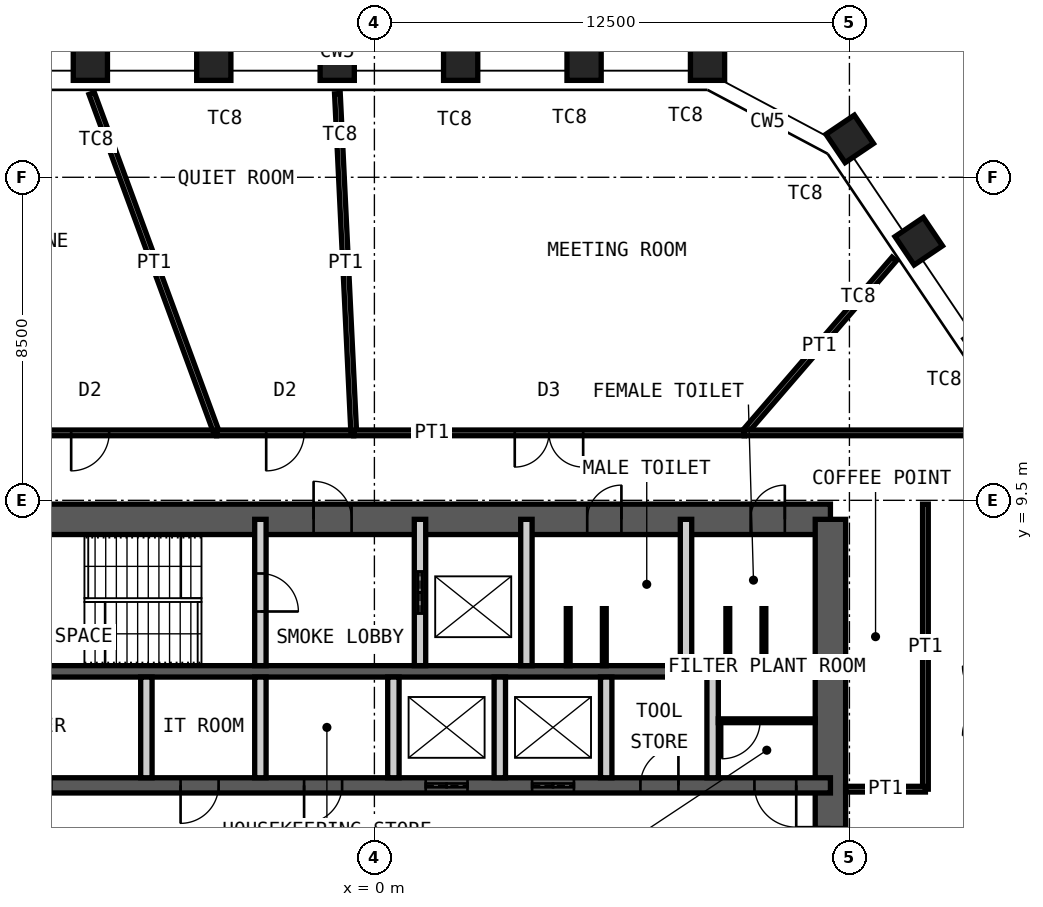
"""IFC4 building model, lengths in metres.
Left out: names, types, materials, properties, quantities, classifications, styles, units other than length and angle.
Written with IfcOpenShell. Run it as: python <this file> out.ifc"""

import sys

from ifc_helpers import new_model, si_unit, direction, frame, frame_2d, origin, origin_2d, place, context, subcontext, project, spatial, rectangle, hollow_rectangle, extrude, element, fill, save


model = new_model("IFC4")
c1 = context("Model", 3, precision=1e-05, world=origin(), true_north=direction((0.0, 1.0)))
c2 = subcontext(c1, "Body", "Model", "MODEL_VIEW")
j1 = project(units=[si_unit("LENGTHUNIT", "METRE"), si_unit("PLANEANGLEUNIT", "RADIAN")], contexts=[c1])
p1 = place(None, origin())
s1 = spatial("IfcSite", under=j1, at=p1, CompositionType="ELEMENT")
p2 = place(p1, origin())
s2 = spatial("IfcBuilding", under=s1, at=p2, CompositionType="ELEMENT")
p3 = place(p2, frame((0.0, 0.0, 308.2)))
s3 = spatial("IfcBuildingStorey", under=s2, at=p3, CompositionType="ELEMENT", Elevation=308.2)
for number, where, z_axis, x_axis in (
    (1, (-7.474, 21.0, 0.0), (0.0, 0.0, 1.0), (-1.0, 0.0, 0.0)),
    (2, (-4.226, 21.0, 0.0), (0.0, 0.0, 1.0), (-1.0, 0.0, 0.0)),
    (3, (-0.978, 21.0, 0.0), (0.0, 0.0, 1.0), (-1.0, 0.0, 0.0)),
    (4, (2.27, 21.0, 0.0), (0.0, 0.0, 1.0), (-1.0, 0.0, 0.0)),
    (5, (5.518, 21.0, 0.0), (0.0, 0.0, 1.0), (-1.0, 0.0, 0.0)),
    (6, (8.766, 21.0, 0.0), (0.0, 0.0, 1.0), (-1.0, 0.0, 0.0)),
    (7, (12.508, 19.01, 0.0), (0.0, 0.0, 1.0), (-0.559, 0.829, 0.0)),
    (8, (14.324, 16.318, 0.0), (0.0, 0.0, 1.0), (-0.559, 0.829, 0.0)),
):
    element("IfcColumn", number, at=place(p3, frame(where, z_axis=z_axis, x_axis=x_axis)), inside=s3, PredefinedType="COLUMN", context=c2, shape_type="SweptSolid", body=[
        extrude(hollow_rectangle(XDim=0.9, YDim=0.9, WallThickness=0.05, at=origin_2d()), origin(), (0.0, 0.0, 1.0), 4.2),
    ])
p4 = place(p3, frame((-12.0, 9.0, 0.0), z_axis=(0.0, 0.0, 1.0), x_axis=(1.0, 0.0, 0.0)))
e9 = element("IfcWall", 9, at=p4, inside=s3, PredefinedType="SHEAR", context=c2, shape_type="SweptSolid", body=[
    extrude(rectangle(XDim=24.0, YDim=0.8, at=frame_2d((12.0, 0.0))), origin(), (0.0, 0.0, 1.0), 4.2),
])
p5 = place(p4, frame((10.4, 0.0, 0.0)))
e10 = element("IfcOpeningElement", 10, at=p5, cuts=e9, PredefinedType="OPENING", context=c2, shape_type="SweptSolid", body=[
    extrude(rectangle(XDim=1.0, YDim=2.1, at=frame_2d((0.5, 1.05))), frame((0.0, 0.41, 0.0), z_axis=(0.0, -1.0, 0.0), x_axis=(1.0, 0.0, 0.0)), (0.0, 0.0, 1.0), 0.82),
])
p6 = place(p4, frame((17.6, 0.0, 0.0)))
e11 = element("IfcOpeningElement", 11, at=p6, cuts=e9, PredefinedType="OPENING", context=c2, shape_type="SweptSolid", body=[
    extrude(rectangle(XDim=0.9, YDim=2.1, at=frame_2d((0.45, 1.05))), frame((0.0, 0.41, 0.0), z_axis=(0.0, -1.0, 0.0), x_axis=(1.0, 0.0, 0.0)), (0.0, 0.0, 1.0), 0.82),
])
p7 = place(p4, frame((21.9, 0.0, 0.0)))
e12 = element("IfcOpeningElement", 12, at=p7, cuts=e9, PredefinedType="OPENING", context=c2, shape_type="SweptSolid", body=[
    extrude(rectangle(XDim=0.9, YDim=2.1, at=frame_2d((0.45, 1.05))), frame((0.0, 0.41, 0.0), z_axis=(0.0, -1.0, 0.0), x_axis=(1.0, 0.0, 0.0)), (0.0, 0.0, 1.0), 0.82),
])
p8 = place(p3, frame((12.0, -9.0, 0.0), z_axis=(0.0, 0.0, 1.0), x_axis=(0.0, 1.0, 0.0)))
e13 = element("IfcWall", 13, at=p8, inside=s3, PredefinedType="SHEAR", context=c2, shape_type="SweptSolid", body=[
    extrude(rectangle(XDim=18.0, YDim=0.8, at=frame_2d((9.0, 0.0))), origin(), (0.0, 0.0, 1.0), 4.2),
])
p9 = place(p8, frame((8.1, 0.0, 0.0)))
e14 = element("IfcOpeningElement", 14, at=p9, cuts=e13, PredefinedType="OPENING", context=c2, shape_type="SweptSolid", body=[
    extrude(rectangle(XDim=1.8, YDim=2.1, at=frame_2d((0.9, 1.05))), frame((0.0, 0.41, 0.0), z_axis=(0.0, -1.0, 0.0), x_axis=(1.0, 0.0, 0.0)), (0.0, 0.0, 1.0), 0.82),
])
p10 = place(p3, frame((-12.0, 5.0, 0.0), z_axis=(0.0, 0.0, 1.0), x_axis=(1.0, 0.0, 0.0)))
e15 = element("IfcWall", 15, at=p10, inside=s3, PredefinedType="SHEAR", context=c2, shape_type="SweptSolid", body=[
    extrude(rectangle(XDim=24.0, YDim=0.3, at=frame_2d((12.0, 0.0))), origin(), (0.0, 0.0, 1.0), 4.2),
])
p11 = place(p3, frame((-12.0, 2.0, 0.0), z_axis=(0.0, 0.0, 1.0), x_axis=(1.0, 0.0, 0.0)))
e16 = element("IfcWall", 16, at=p11, inside=s3, PredefinedType="SHEAR", context=c2, shape_type="SweptSolid", body=[
    extrude(rectangle(XDim=24.0, YDim=0.4, at=frame_2d((12.0, 0.0))), origin(), (0.0, 0.0, 1.0), 4.2),
])
p12 = place(p11, frame((2.4, 0.0, 0.0)))
e17 = element("IfcOpeningElement", 17, at=p12, cuts=e16, PredefinedType="OPENING", context=c2, shape_type="SweptSolid", body=[
    extrude(rectangle(XDim=1.1, YDim=2.1, at=frame_2d((0.55, 1.05))), frame((0.0, 0.21, 0.0), z_axis=(0.0, -1.0, 0.0), x_axis=(1.0, 0.0, 0.0)), (0.0, 0.0, 1.0), 0.42),
])
p13 = place(p11, frame((22.0, 0.0, 0.0)))
e18 = element("IfcOpeningElement", 18, at=p13, cuts=e16, PredefinedType="OPENING", context=c2, shape_type="SweptSolid", body=[
    extrude(rectangle(XDim=1.1, YDim=2.1, at=frame_2d((0.55, 1.05))), frame((0.0, 0.21, 0.0), z_axis=(0.0, -1.0, 0.0), x_axis=(1.0, 0.0, 0.0)), (0.0, 0.0, 1.0), 0.42),
])
p14 = place(p11, frame((10.15, 0.0, 0.0)))
e19 = element("IfcOpeningElement", 19, at=p14, cuts=e16, PredefinedType="OPENING", context=c2, shape_type="SweptSolid", body=[
    extrude(rectangle(XDim=1.0, YDim=2.1, at=frame_2d((0.5, 1.05))), frame((0.0, 0.21, 0.0), z_axis=(0.0, -1.0, 0.0), x_axis=(1.0, 0.0, 0.0)), (0.0, 0.0, 1.0), 0.42),
])
p15 = place(p11, frame((6.9, 0.0, 0.0)))
e20 = element("IfcOpeningElement", 20, at=p15, cuts=e16, PredefinedType="OPENING", context=c2, shape_type="SweptSolid", body=[
    extrude(rectangle(XDim=1.0, YDim=2.1, at=frame_2d((0.5, 1.05))), frame((0.0, 0.21, 0.0), z_axis=(0.0, -1.0, 0.0), x_axis=(1.0, 0.0, 0.0)), (0.0, 0.0, 1.0), 0.42),
])
p16 = place(p11, frame((13.35, 0.0, 0.0)))
e21 = element("IfcOpeningElement", 21, at=p16, cuts=e16, PredefinedType="OPENING", context=c2, shape_type="SweptSolid", body=[
    extrude(rectangle(XDim=1.1, YDim=2.4, at=frame_2d((0.55, 1.2))), frame((0.0, 0.21, 0.0), z_axis=(0.0, -1.0, 0.0), x_axis=(1.0, 0.0, 0.0)), (0.0, 0.0, 1.0), 0.42),
])
p17 = place(p11, frame((16.15, 0.0, 0.0)))
e22 = element("IfcOpeningElement", 22, at=p17, cuts=e16, PredefinedType="OPENING", context=c2, shape_type="SweptSolid", body=[
    extrude(rectangle(XDim=1.1, YDim=2.4, at=frame_2d((0.55, 1.2))), frame((0.0, 0.21, 0.0), z_axis=(0.0, -1.0, 0.0), x_axis=(1.0, 0.0, 0.0)), (0.0, 0.0, 1.0), 0.42),
])
p18 = place(p11, frame((19.0, 0.0, 0.0)))
e23 = element("IfcOpeningElement", 23, at=p18, cuts=e16, PredefinedType="OPENING", context=c2, shape_type="SweptSolid", body=[
    extrude(rectangle(XDim=1.0, YDim=2.1, at=frame_2d((0.5, 1.05))), frame((0.0, 0.21, 0.0), z_axis=(0.0, -1.0, 0.0), x_axis=(1.0, 0.0, 0.0)), (0.0, 0.0, 1.0), 0.42),
])
p19 = place(p3, frame((-3.0, 5.15, 0.0), z_axis=(0.0, 0.0, 1.0), x_axis=(0.0, 1.0, 0.0)))
e24 = element("IfcWall", 24, at=p19, inside=s3, PredefinedType="PARTITIONING", context=c2, shape_type="SweptSolid", body=[
    extrude(rectangle(XDim=3.85, YDim=0.3, at=frame_2d((1.925, 0.0))), origin(), (0.0, 0.0, 1.0), 3.98),
])
p20 = place(p19, frame((1.425, 0.0, 0.0)))
e25 = element("IfcOpeningElement", 25, at=p20, cuts=e24, PredefinedType="OPENING", context=c2, shape_type="SweptSolid", body=[
    extrude(rectangle(XDim=1.0, YDim=2.1, at=frame_2d((0.5, 1.05))), frame((0.0, 0.16, 0.0), z_axis=(0.0, -1.0, 0.0), x_axis=(1.0, 0.0, 0.0)), (0.0, 0.0, 1.0), 0.32),
])
p21 = place(p3, frame((1.2, 5.15, 0.0), z_axis=(0.0, 0.0, 1.0), x_axis=(0.0, 1.0, 0.0)))
e26 = element("IfcWall", 26, at=p21, inside=s3, PredefinedType="PARTITIONING", context=c2, shape_type="SweptSolid", body=[
    extrude(rectangle(XDim=3.85, YDim=0.3, at=frame_2d((1.925, 0.0))), origin(), (0.0, 0.0, 1.0), 3.98),
])
p22 = place(p21, frame((1.375, 0.0, 0.0)))
e27 = element("IfcOpeningElement", 27, at=p22, cuts=e26, PredefinedType="OPENING", context=c2, shape_type="SweptSolid", body=[
    extrude(rectangle(XDim=1.1, YDim=2.4, at=frame_2d((0.55, 1.2))), frame((0.0, 0.16, 0.0), z_axis=(0.0, -1.0, 0.0), x_axis=(1.0, 0.0, 0.0)), (0.0, 0.0, 1.0), 0.32),
])
for number, where, z_axis, x_axis in (
    (28, (4.0, 5.15, 0.0), (0.0, 0.0, 1.0), (0.0, 1.0, 0.0)),
    (29, (8.2, 5.15, 0.0), (0.0, 0.0, 1.0), (0.0, 1.0, 0.0)),
):
    element("IfcWall", number, at=place(p3, frame(where, z_axis=z_axis, x_axis=x_axis)), inside=s3, PredefinedType="PARTITIONING", context=c2, shape_type="SweptSolid", body=[
        extrude(rectangle(XDim=3.85, YDim=0.3, at=frame_2d((1.925, 0.0))), origin(), (0.0, 0.0, 1.0), 3.98),
    ])
for number, where, z_axis, x_axis in (
    (30, (-6.0, 2.2, 0.0), (0.0, 0.0, 1.0), (0.0, 1.0, 0.0)),
    (31, (-3.0, 2.2, 0.0), (0.0, 0.0, 1.0), (0.0, 1.0, 0.0)),
    (32, (0.5, 2.2, 0.0), (0.0, 0.0, 1.0), (0.0, 1.0, 0.0)),
    (33, (3.3, 2.2, 0.0), (0.0, 0.0, 1.0), (0.0, 1.0, 0.0)),
    (34, (6.1, 2.2, 0.0), (0.0, 0.0, 1.0), (0.0, 1.0, 0.0)),
    (35, (8.9, 2.2, 0.0), (0.0, 0.0, 1.0), (0.0, 1.0, 0.0)),
):
    element("IfcWall", number, at=place(p3, frame(where, z_axis=z_axis, x_axis=x_axis)), inside=s3, PredefinedType="PARTITIONING", context=c2, shape_type="SweptSolid", body=[
        extrude(rectangle(XDim=2.65, YDim=0.3, at=frame_2d((1.325, 0.0))), origin(), (0.0, 0.0, 1.0), 3.98),
    ])
p23 = place(p3, frame((9.05, 3.7, 0.0), z_axis=(0.0, 0.0, 1.0), x_axis=(1.0, 0.0, 0.0)))
e36 = element("IfcWall", 36, at=p23, inside=s3, PredefinedType="PARTITIONING", context=c2, shape_type="SweptSolid", body=[
    extrude(rectangle(XDim=2.55, YDim=0.1, at=frame_2d((1.275, 0.0))), origin(), (0.0, 0.0, 1.0), 3.98),
])
p24 = place(p23, frame((0.1, 0.0, 0.0)))
e37 = element("IfcOpeningElement", 37, at=p24, cuts=e36, PredefinedType="OPENING", context=c2, shape_type="SweptSolid", body=[
    extrude(rectangle(XDim=1.0, YDim=2.4, at=frame_2d((0.5, 1.2))), frame((0.0, 0.06, 0.0), z_axis=(0.0, -1.0, 0.0), x_axis=(1.0, 0.0, 0.0)), (0.0, 0.0, 1.0), 0.12),
])
for number, where, z_axis, x_axis in (
    (38, (5.1, 5.15, 0.0), (0.0, 0.0, 1.0), (0.0, 1.0, 0.0)),
    (39, (6.05, 5.15, 0.0), (0.0, 0.0, 1.0), (0.0, 1.0, 0.0)),
    (40, (9.3, 5.15, 0.0), (0.0, 0.0, 1.0), (0.0, 1.0, 0.0)),
    (41, (10.25, 5.15, 0.0), (0.0, 0.0, 1.0), (0.0, 1.0, 0.0)),
):
    element("IfcWall", number, at=place(p3, frame(where, z_axis=z_axis, x_axis=x_axis)), inside=s3, PredefinedType="PARTITIONING", context=c2, shape_type="SweptSolid", body=[
        extrude(rectangle(XDim=1.5, YDim=0.1, at=frame_2d((0.75, 0.0))), origin(), (0.0, 0.0, 1.0), 2.1),
    ])
p25 = place(p3, frame((13.678, 15.85, 0.0), z_axis=(0.0, 0.0, 1.0), x_axis=(-0.65333269737, -0.757070925704, 0.0)))
e42 = element("IfcWall", 42, at=p25, inside=s3, PredefinedType="PARTITIONING", context=c2, shape_type="SweptSolid", body=[
    extrude(rectangle(XDim=6.044, YDim=0.15, at=frame_2d((3.022, 0.0))), origin(), (0.0, 0.0, 1.0), 3.33),
])
p26 = place(p3, frame((9.73, 11.275, 0.0), z_axis=(0.0, 0.0, 1.0), x_axis=(1.0, 0.0, 0.0)))
e43 = element("IfcWall", 43, at=p26, inside=s3, PredefinedType="PARTITIONING", context=c2, shape_type="SweptSolid", body=[
    extrude(rectangle(XDim=6.645, YDim=0.15, at=frame_2d((3.323, 0.0))), origin(), (0.0, 0.0, 1.0), 4.03),
])
p27 = place(p3, frame((-10.807, 11.275, 0.0), z_axis=(0.0, 0.0, 1.0), x_axis=(1.0, 0.0, 0.0)))
e44 = element("IfcWall", 44, at=p27, inside=s3, PredefinedType="PARTITIONING", context=c2, shape_type="SweptSolid", body=[
    extrude(rectangle(XDim=6.656, YDim=0.15, at=frame_2d((3.328, 0.0))), origin(), (0.0, 0.0, 1.0), 4.03),
])
p28 = place(p27, frame((2.828, 0.0, 0.0)))
e45 = element("IfcOpeningElement", 45, at=p28, cuts=e44, PredefinedType="OPENING", context=c2, shape_type="SweptSolid", body=[
    extrude(rectangle(XDim=1.0, YDim=2.4, at=frame_2d((0.5, 1.2))), frame((0.0, 0.085, 0.0), z_axis=(0.0, -1.0, 0.0), x_axis=(1.0, 0.0, 0.0)), (0.0, 0.0, 1.0), 0.17),
])
p29 = place(p3, frame((-7.44, 20.206, 0.0), z_axis=(0.0, 0.0, 1.0), x_axis=(0.345511582319, -0.93841448544, 0.0)))
e46 = element("IfcWall", 46, at=p29, inside=s3, PredefinedType="PARTITIONING", context=c2, shape_type="SweptSolid", body=[
    extrude(rectangle(XDim=9.517, YDim=0.15, at=frame_2d((4.759, 0.0))), origin(), (0.0, 0.0, 1.0), 3.33),
])
p30 = place(p3, frame((-4.151, 11.275, 0.0), z_axis=(0.0, 0.0, 1.0), x_axis=(1.0, 0.0, 0.0)))
e47 = element("IfcWall", 47, at=p30, inside=s3, PredefinedType="PARTITIONING", context=c2, shape_type="SweptSolid", body=[
    extrude(rectangle(XDim=3.608, YDim=0.15, at=frame_2d((1.804, 0.0))), origin(), (0.0, 0.0, 1.0), 4.03),
])
p31 = place(p30, frame((1.304, 0.0, 0.0)))
e48 = element("IfcOpeningElement", 48, at=p31, cuts=e47, PredefinedType="OPENING", context=c2, shape_type="SweptSolid", body=[
    extrude(rectangle(XDim=1.0, YDim=2.4, at=frame_2d((0.5, 1.2))), frame((0.0, 0.085, 0.0), z_axis=(0.0, -1.0, 0.0), x_axis=(1.0, 0.0, 0.0)), (0.0, 0.0, 1.0), 0.17),
])
p32 = place(p3, frame((-0.973, 20.2, 0.0), z_axis=(0.0, 0.0, 1.0), x_axis=(0.04814150135, -0.998840525734, 0.0)))
e49 = element("IfcWall", 49, at=p32, inside=s3, PredefinedType="PARTITIONING", context=c2, shape_type="SweptSolid", body=[
    extrude(rectangle(XDim=8.936, YDim=0.15, at=frame_2d((4.468, 0.0))), origin(), (0.0, 0.0, 1.0), 3.33),
])
p33 = place(p3, frame((-0.543, 11.275, 0.0), z_axis=(0.0, 0.0, 1.0), x_axis=(1.0, 0.0, 0.0)))
e50 = element("IfcWall", 50, at=p33, inside=s3, PredefinedType="PARTITIONING", context=c2, shape_type="SweptSolid", body=[
    extrude(rectangle(XDim=10.273, YDim=0.15, at=frame_2d((5.137, 0.0))), origin(), (0.0, 0.0, 1.0), 4.03),
])
p34 = place(p33, frame((4.237, 0.0, 0.0)))
e51 = element("IfcOpeningElement", 51, at=p34, cuts=e50, PredefinedType="OPENING", context=c2, shape_type="SweptSolid", body=[
    extrude(rectangle(XDim=1.8, YDim=2.4, at=frame_2d((0.9, 1.2))), frame((0.0, 0.085, 0.0), z_axis=(0.0, -1.0, 0.0), x_axis=(1.0, 0.0, 0.0)), (0.0, 0.0, 1.0), 0.17),
])
p35 = place(p3, frame((14.5, 1.9, 0.0), z_axis=(0.0, 0.0, 1.0), x_axis=(0.0, 1.0, 0.0)))
e52 = element("IfcWall", 52, at=p35, inside=s3, PredefinedType="PARTITIONING", context=c2, shape_type="SweptSolid", body=[
    extrude(rectangle(XDim=7.5, YDim=0.15, at=frame_2d((3.75, 0.0))), origin(), (0.0, 0.0, 1.0), 4.03),
])
p36 = place(p3, frame((12.4, 1.9, 0.0), z_axis=(0.0, 0.0, 1.0), x_axis=(1.0, 0.0, 0.0)))
e53 = element("IfcWall", 53, at=p36, inside=s3, PredefinedType="PARTITIONING", context=c2, shape_type="SweptSolid", body=[
    extrude(rectangle(XDim=2.1, YDim=0.15, at=frame_2d((1.05, 0.0))), origin(), (0.0, 0.0, 1.0), 2.93),
])
p37 = place(p5, origin())
e54 = element("IfcDoor", 54, at=p37, inside=s3, OperationType="SINGLE_SWING_RIGHT", PredefinedType="DOOR", context=c2, shape_type="SweptSolid", body=[
    extrude(rectangle(XDim=1.0, YDim=2.1, at=frame_2d((0.5, 1.05))), frame((0.0, 0.025, 0.0), z_axis=(0.0, -1.0, 0.0), x_axis=(1.0, 0.0, 0.0)), (0.0, 0.0, 1.0), 0.05),
])
fill(e10, e54)
p38 = place(p6, origin())
e55 = element("IfcDoor", 55, at=p38, inside=s3, OperationType="SINGLE_SWING_LEFT", PredefinedType="DOOR", context=c2, shape_type="SweptSolid", body=[
    extrude(rectangle(XDim=0.9, YDim=2.1, at=frame_2d((0.45, 1.05))), frame((0.0, 0.025, 0.0), z_axis=(0.0, -1.0, 0.0), x_axis=(1.0, 0.0, 0.0)), (0.0, 0.0, 1.0), 0.05),
])
fill(e11, e55)
p39 = place(p7, origin())
e56 = element("IfcDoor", 56, at=p39, inside=s3, OperationType="SINGLE_SWING_LEFT", PredefinedType="DOOR", context=c2, shape_type="SweptSolid", body=[
    extrude(rectangle(XDim=0.9, YDim=2.1, at=frame_2d((0.45, 1.05))), frame((0.0, 0.025, 0.0), z_axis=(0.0, -1.0, 0.0), x_axis=(1.0, 0.0, 0.0)), (0.0, 0.0, 1.0), 0.05),
])
fill(e12, e56)
p40 = place(p20, origin())
e57 = element("IfcDoor", 57, at=p40, inside=s3, OperationType="SINGLE_SWING_LEFT", PredefinedType="DOOR", context=c2, shape_type="SweptSolid", body=[
    extrude(rectangle(XDim=1.0, YDim=2.1, at=frame_2d((0.5, 1.05))), frame((0.0, 0.025, 0.0), z_axis=(0.0, -1.0, 0.0), x_axis=(1.0, 0.0, 0.0)), (0.0, 0.0, 1.0), 0.05),
])
fill(e25, e57)
p41 = place(p13, origin())
e58 = element("IfcDoor", 58, at=p41, inside=s3, OperationType="SINGLE_SWING_RIGHT", PredefinedType="DOOR", context=c2, shape_type="SweptSolid", body=[
    extrude(rectangle(XDim=1.1, YDim=2.1, at=frame_2d((0.55, 1.05))), frame((0.0, 0.025, 0.0), z_axis=(0.0, -1.0, 0.0), x_axis=(1.0, 0.0, 0.0)), (0.0, 0.0, 1.0), 0.05),
])
fill(e18, e58)
p42 = place(p14, origin())
e59 = element("IfcDoor", 59, at=p42, inside=s3, OperationType="SINGLE_SWING_LEFT", PredefinedType="DOOR", context=c2, shape_type="SweptSolid", body=[
    extrude(rectangle(XDim=1.0, YDim=2.1, at=frame_2d((0.5, 1.05))), frame((0.0, 0.025, 0.0), z_axis=(0.0, -1.0, 0.0), x_axis=(1.0, 0.0, 0.0)), (0.0, 0.0, 1.0), 0.05),
])
fill(e19, e59)
p43 = place(p9, origin())
e60 = element("IfcDoor", 60, at=p43, inside=s3, OperationType="DOUBLE_DOOR_DOUBLE_SWING", PredefinedType="DOOR", context=c2, shape_type="SweptSolid", body=[
    extrude(rectangle(XDim=1.8, YDim=2.1, at=frame_2d((0.9, 1.05))), frame((0.0, 0.025, 0.0), z_axis=(0.0, -1.0, 0.0), x_axis=(1.0, 0.0, 0.0)), (0.0, 0.0, 1.0), 0.05),
])
fill(e14, e60)
p44 = place(p22, origin())
e61 = element("IfcDoor", 61, at=p44, inside=s3, OperationType="DOUBLE_DOOR_SLIDING", PredefinedType="DOOR", context=c2, shape_type="SweptSolid", body=[
    extrude(rectangle(XDim=1.1, YDim=2.4, at=frame_2d((0.55, 1.2))), frame((0.0, 0.025, 0.0), z_axis=(0.0, -1.0, 0.0), x_axis=(1.0, 0.0, 0.0)), (0.0, 0.0, 1.0), 0.05),
])
fill(e27, e61)
p45 = place(p15, origin())
e62 = element("IfcDoor", 62, at=p45, inside=s3, OperationType="SINGLE_SWING_LEFT", PredefinedType="DOOR", context=c2, shape_type="SweptSolid", body=[
    extrude(rectangle(XDim=1.0, YDim=2.1, at=frame_2d((0.5, 1.05))), frame((0.0, 0.025, 0.0), z_axis=(0.0, -1.0, 0.0), x_axis=(1.0, 0.0, 0.0)), (0.0, 0.0, 1.0), 0.05),
])
fill(e20, e62)
p46 = place(p16, origin())
e63 = element("IfcDoor", 63, at=p46, inside=s3, OperationType="DOUBLE_DOOR_SLIDING", PredefinedType="DOOR", context=c2, shape_type="SweptSolid", body=[
    extrude(rectangle(XDim=1.1, YDim=2.4, at=frame_2d((0.55, 1.2))), frame((0.0, 0.025, 0.0), z_axis=(0.0, -1.0, 0.0), x_axis=(1.0, 0.0, 0.0)), (0.0, 0.0, 1.0), 0.05),
])
fill(e21, e63)
p47 = place(p17, origin())
e64 = element("IfcDoor", 64, at=p47, inside=s3, OperationType="DOUBLE_DOOR_SLIDING", PredefinedType="DOOR", context=c2, shape_type="SweptSolid", body=[
    extrude(rectangle(XDim=1.1, YDim=2.4, at=frame_2d((0.55, 1.2))), frame((0.0, 0.025, 0.0), z_axis=(0.0, -1.0, 0.0), x_axis=(1.0, 0.0, 0.0)), (0.0, 0.0, 1.0), 0.05),
])
fill(e22, e64)
p48 = place(p18, origin())
e65 = element("IfcDoor", 65, at=p48, inside=s3, OperationType="SINGLE_SWING_LEFT", PredefinedType="DOOR", context=c2, shape_type="SweptSolid", body=[
    extrude(rectangle(XDim=1.0, YDim=2.1, at=frame_2d((0.5, 1.05))), frame((0.0, 0.025, 0.0), z_axis=(0.0, -1.0, 0.0), x_axis=(1.0, 0.0, 0.0)), (0.0, 0.0, 1.0), 0.05),
])
fill(e23, e65)
p49 = place(p24, origin())
e66 = element("IfcDoor", 66, at=p49, inside=s3, OperationType="SINGLE_SWING_LEFT", PredefinedType="DOOR", context=c2, shape_type="SweptSolid", body=[
    extrude(rectangle(XDim=1.0, YDim=2.4, at=frame_2d((0.5, 1.2))), frame((0.0, 0.025, 0.0), z_axis=(0.0, -1.0, 0.0), x_axis=(1.0, 0.0, 0.0)), (0.0, 0.0, 1.0), 0.05),
])
fill(e37, e66)
p50 = place(p28, origin())
e67 = element("IfcDoor", 67, at=p50, inside=s3, OperationType="SINGLE_SWING_LEFT", PredefinedType="DOOR", context=c2, shape_type="SweptSolid", body=[
    extrude(rectangle(XDim=1.0, YDim=2.4, at=frame_2d((0.5, 1.2))), frame((0.0, 0.025, 0.0), z_axis=(0.0, -1.0, 0.0), x_axis=(1.0, 0.0, 0.0)), (0.0, 0.0, 1.0), 0.05),
])
fill(e45, e67)
p51 = place(p31, origin())
e68 = element("IfcDoor", 68, at=p51, inside=s3, OperationType="SINGLE_SWING_LEFT", PredefinedType="DOOR", context=c2, shape_type="SweptSolid", body=[
    extrude(rectangle(XDim=1.0, YDim=2.4, at=frame_2d((0.5, 1.2))), frame((0.0, 0.025, 0.0), z_axis=(0.0, -1.0, 0.0), x_axis=(1.0, 0.0, 0.0)), (0.0, 0.0, 1.0), 0.05),
])
fill(e48, e68)
p52 = place(p34, origin())
e69 = element("IfcDoor", 69, at=p52, inside=s3, OperationType="DOUBLE_DOOR_DOUBLE_SWING", PredefinedType="DOOR", context=c2, shape_type="SweptSolid", body=[
    extrude(rectangle(XDim=1.8, YDim=2.4, at=frame_2d((0.9, 1.2))), frame((0.0, 0.025, 0.0), z_axis=(0.0, -1.0, 0.0), x_axis=(1.0, 0.0, 0.0)), (0.0, 0.0, 1.0), 0.05),
])
fill(e51, e69)
save(model, sys.argv[1])
